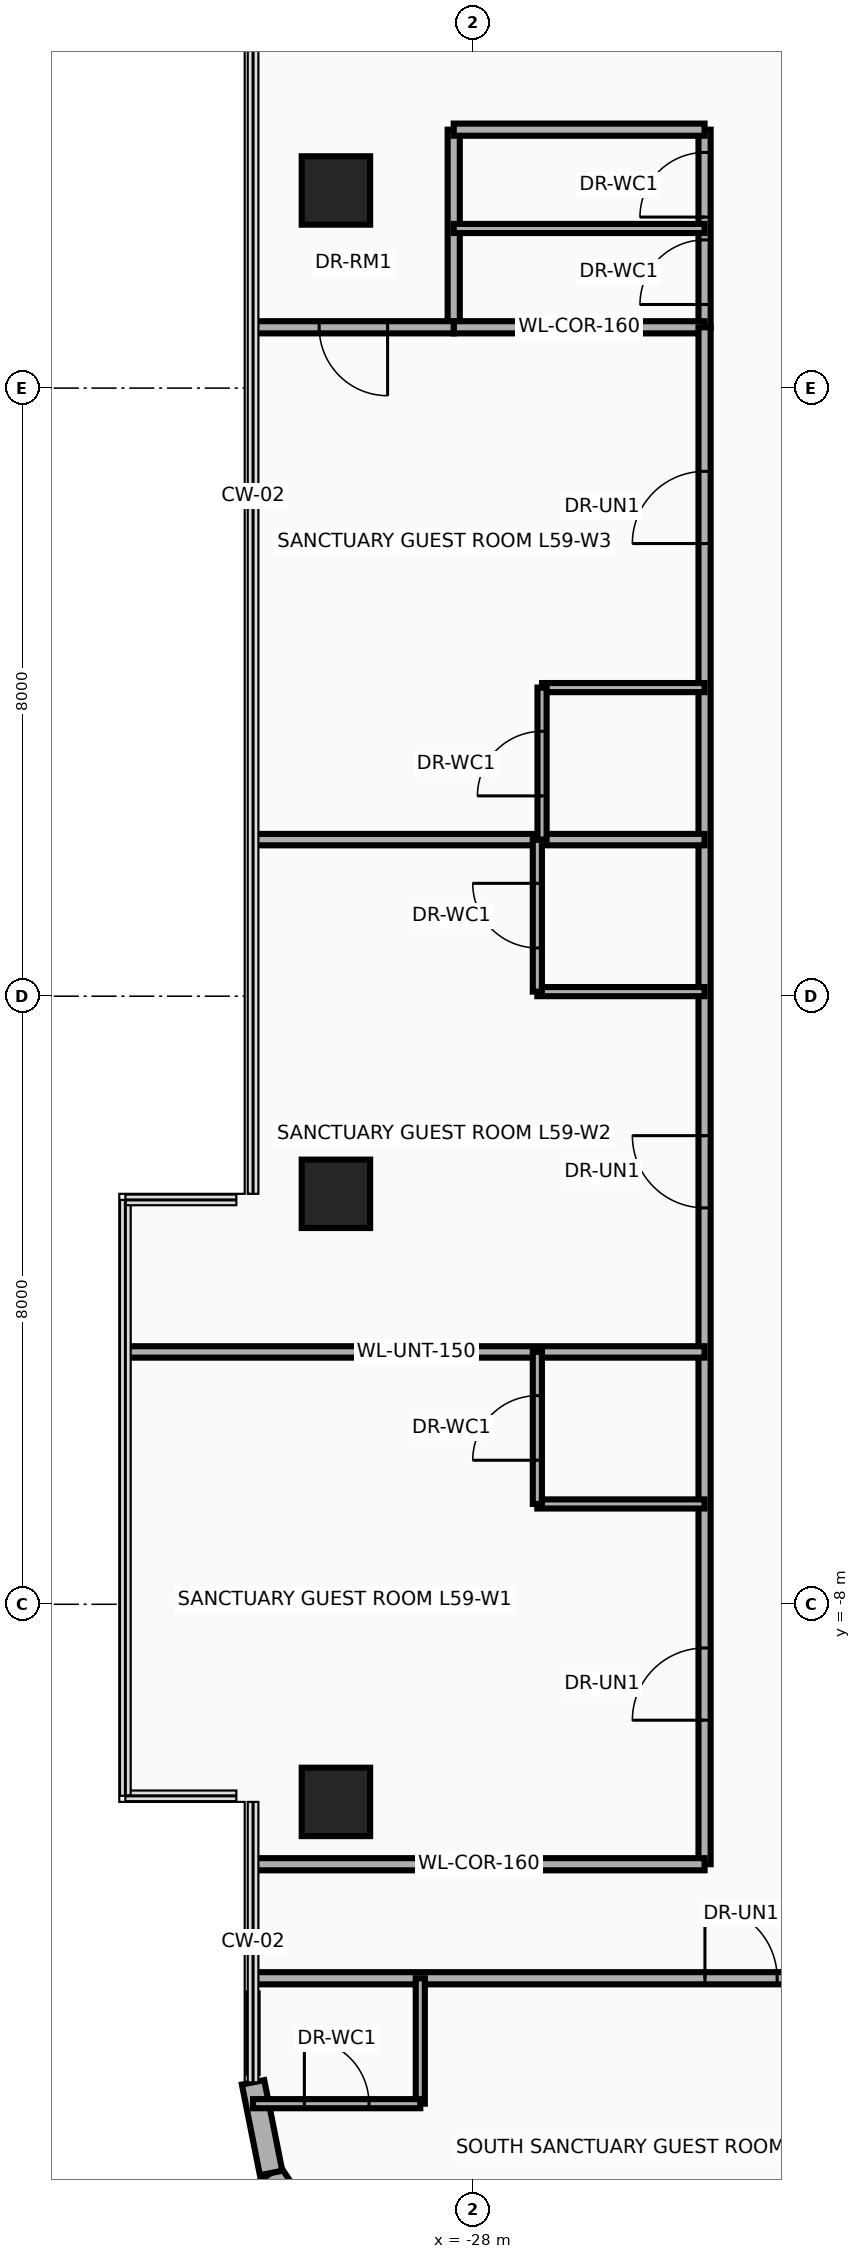
"""IFC4 building model, lengths in metres.
Left out: names, types, materials, properties, quantities, classifications, styles, units other than length and angle.
Written with IfcOpenShell. Run it as: python <this file> out.ifc"""

import sys

from ifc_helpers import new_model, si_unit, direction, frame, frame_2d, origin, origin_2d, place, context, subcontext, project, spatial, rectangle, extrude, source, transform, mapped, element, fill, save


model = new_model("IFC4")
c1 = context("Model", 3, precision=1e-05, world=origin(), true_north=direction((0.0, 1.0)))
c2 = subcontext(c1, "Body", "Model", "MODEL_VIEW")
j1 = project(units=[si_unit("LENGTHUNIT", "METRE"), si_unit("PLANEANGLEUNIT", "RADIAN")], contexts=[c1])
p1 = place(None, origin())
s1 = spatial("IfcSite", under=j1, at=p1, CompositionType="ELEMENT")
p2 = place(p1, origin())
s2 = spatial("IfcBuilding", under=s1, at=p2, CompositionType="ELEMENT")
p3 = place(p2, frame((0.0, 0.0, 230.0)))
s3 = spatial("IfcBuildingStorey", under=s2, at=p3, CompositionType="ELEMENT", Elevation=230.0)
m1 = source(origin(), c2, "Body", "SweptSolid", [
    extrude(rectangle(XDim=0.9, YDim=0.9, at=origin_2d()), origin(), (0.0, 0.0, 1.0), 3.5),
])
for number, where, z_axis, x_axis in (
    (1, (-29.8, -10.6, 0.0), (0.0, 0.0, 1.0), (1.0, 0.0, 0.0)),
    (2, (-29.8, -2.6, 0.0), (0.0, 0.0, 1.0), (1.0, 0.0, 0.0)),
    (3, (-29.8, 10.6, 0.0), (0.0, 0.0, 1.0), (1.0, 0.0, 0.0)),
):
    element("IfcColumn", number, at=place(p3, frame(where, z_axis=z_axis, x_axis=x_axis)), inside=s3, PredefinedType="COLUMN", context=c2, shape_type="MappedRepresentation", body=[
        mapped(m1, transform((0.0, 0.0, 0.0), x_axis=(1.0, 0.0, 0.0), y_axis=(0.0, 1.0, 0.0), z_axis=(0.0, 0.0, 1.0), scale=1.0)),
    ])
p4 = place(p3, frame((-29.983, -16.483, 0.0), z_axis=(0.0, 0.0, 1.0), x_axis=(-0.555635100982, 0.831426265255, 0.0)))
e4 = element("IfcWall", 4, at=p4, inside=s3, PredefinedType="SOLIDWALL", context=c2, shape_type="SweptSolid", body=[
    extrude(rectangle(XDim=1.205, YDim=0.3, at=frame_2d((0.603, 0.0))), origin(), (0.0, 0.0, 1.0), 3.26),
])
p5 = place(p3, frame((-30.653, -15.482, 0.0), z_axis=(0.0, 0.0, 1.0), x_axis=(-0.194996050505, 0.980804027463, 0.0)))
e5 = element("IfcWall", 5, at=p5, inside=s3, PredefinedType="SOLIDWALL", context=c2, shape_type="SweptSolid", body=[
    extrude(rectangle(XDim=1.216, YDim=0.3, at=frame_2d((0.608, 0.0))), origin(), (0.0, 0.0, 1.0), 3.26),
])
p6 = place(p3, frame((-28.25, 8.8, 0.0), z_axis=(0.0, 0.0, 1.0), x_axis=(0.0, 1.0, 0.0)))
e6 = element("IfcWall", 6, at=p6, inside=s3, PredefinedType="PARTITIONING", context=c2, shape_type="SweptSolid", body=[
    extrude(rectangle(XDim=2.6, YDim=0.16, at=frame_2d((1.3, 0.0))), origin(), (0.0, 0.0, 1.0), 2.544),
])
p7 = place(p3, frame((-24.95, 8.8, 0.0), z_axis=(0.0, 0.0, 1.0), x_axis=(0.0, 1.0, 0.0)))
e7 = element("IfcWall", 7, at=p7, inside=s3, PredefinedType="PARTITIONING", context=c2, shape_type="SweptSolid", body=[
    extrude(rectangle(XDim=2.6, YDim=0.16, at=frame_2d((1.3, 0.0))), origin(), (0.0, 0.0, 1.0), 2.544),
])
p8 = place(p7, frame((0.3, 0.0, 0.0)))
e8 = element("IfcOpeningElement", 8, at=p8, cuts=e7, PredefinedType="OPENING", context=c2, shape_type="SweptSolid", body=[
    extrude(rectangle(XDim=0.85, YDim=2.1, at=frame_2d((0.425, 1.05))), frame((0.0, 0.095, 0.0), z_axis=(0.0, -1.0, 0.0), x_axis=(1.0, 0.0, 0.0)), (0.0, 0.0, 1.0), 0.19),
])
p9 = place(p7, frame((1.45, 0.0, 0.0)))
e9 = element("IfcOpeningElement", 9, at=p9, cuts=e7, PredefinedType="OPENING", context=c2, shape_type="SweptSolid", body=[
    extrude(rectangle(XDim=0.85, YDim=2.1, at=frame_2d((0.425, 1.05))), frame((0.0, 0.095, 0.0), z_axis=(0.0, -1.0, 0.0), x_axis=(1.0, 0.0, 0.0)), (0.0, 0.0, 1.0), 0.19),
])
for number, where, z_axis, x_axis in (
    (10, (-28.25, 8.8, 0.0), (0.0, 0.0, 1.0), (1.0, 0.0, 0.0)),
    (11, (-28.25, 11.4, 0.0), (0.0, 0.0, 1.0), (1.0, 0.0, 0.0)),
):
    element("IfcWall", number, at=place(p3, frame(where, z_axis=z_axis, x_axis=x_axis)), inside=s3, PredefinedType="PARTITIONING", context=c2, shape_type="SweptSolid", body=[
        extrude(rectangle(XDim=3.3, YDim=0.16, at=frame_2d((1.65, 0.0))), origin(), (0.0, 0.0, 1.0), 3.26),
    ])
p10 = place(p3, frame((-28.25, 10.1, 0.0), z_axis=(0.0, 0.0, 1.0), x_axis=(1.0, 0.0, 0.0)))
e12 = element("IfcWall", 12, at=p10, inside=s3, PredefinedType="PARTITIONING", context=c2, shape_type="SweptSolid", body=[
    extrude(rectangle(XDim=3.3, YDim=0.12, at=frame_2d((1.65, 0.0))), origin(), (0.0, 0.0, 1.0), 3.26),
])
p11 = place(p3, frame((-24.95, -11.42, 0.0), z_axis=(0.0, 0.0, 1.0), x_axis=(0.0, 1.0, 0.0)))
e13 = element("IfcWall", 13, at=p11, inside=s3, PredefinedType="PARTITIONING", context=c2, shape_type="SweptSolid", body=[
    extrude(rectangle(XDim=20.22, YDim=0.16, at=frame_2d((10.11, 0.0))), origin(), (0.0, 0.0, 1.0), 2.544),
])
p12 = place(p11, frame((1.895, 0.0, 0.0)))
e14 = element("IfcOpeningElement", 14, at=p12, cuts=e13, PredefinedType="OPENING", context=c2, shape_type="SweptSolid", body=[
    extrude(rectangle(XDim=0.95, YDim=2.15, at=frame_2d((0.475, 1.075))), frame((0.0, 0.095, 0.0), z_axis=(0.0, -1.0, 0.0), x_axis=(1.0, 0.0, 0.0)), (0.0, 0.0, 1.0), 0.19),
])
p13 = place(p11, frame((8.635, 0.0, 0.0)))
e15 = element("IfcOpeningElement", 15, at=p13, cuts=e13, PredefinedType="OPENING", context=c2, shape_type="SweptSolid", body=[
    extrude(rectangle(XDim=0.95, YDim=2.15, at=frame_2d((0.475, 1.075))), frame((0.0, 0.095, 0.0), z_axis=(0.0, -1.0, 0.0), x_axis=(1.0, 0.0, 0.0)), (0.0, 0.0, 1.0), 0.19),
])
p14 = place(p11, frame((17.375, 0.0, 0.0)))
e16 = element("IfcOpeningElement", 16, at=p14, cuts=e13, PredefinedType="OPENING", context=c2, shape_type="SweptSolid", body=[
    extrude(rectangle(XDim=0.95, YDim=2.15, at=frame_2d((0.475, 1.075))), frame((0.0, 0.095, 0.0), z_axis=(0.0, -1.0, 0.0), x_axis=(1.0, 0.0, 0.0)), (0.0, 0.0, 1.0), 0.19),
])
p15 = place(p3, frame((-30.89, 8.8, 0.0), z_axis=(0.0, 0.0, 1.0), x_axis=(1.0, 0.0, 0.0)))
e17 = element("IfcWall", 17, at=p15, inside=s3, PredefinedType="PARTITIONING", context=c2, shape_type="SweptSolid", body=[
    extrude(rectangle(XDim=2.64, YDim=0.16, at=frame_2d((1.32, 0.0))), origin(), (0.0, 0.0, 1.0), 2.706),
])
p16 = place(p15, frame((0.87, 0.0, 0.0)))
e18 = element("IfcOpeningElement", 18, at=p16, cuts=e17, PredefinedType="OPENING", context=c2, shape_type="SweptSolid", body=[
    extrude(rectangle(XDim=0.9, YDim=2.1, at=frame_2d((0.45, 1.05))), frame((0.0, 0.095, 0.0), z_axis=(0.0, -1.0, 0.0), x_axis=(1.0, 0.0, 0.0)), (0.0, 0.0, 1.0), 0.19),
])
p17 = place(p3, frame((-32.54, -4.68, 0.0), z_axis=(0.0, 0.0, 1.0), x_axis=(1.0, 0.0, 0.0)))
e19 = element("IfcWall", 19, at=p17, inside=s3, PredefinedType="PARTITIONING", context=c2, shape_type="SweptSolid", body=[
    extrude(rectangle(XDim=7.59, YDim=0.15, at=frame_2d((3.795, 0.0))), origin(), (0.0, 0.0, 1.0), 2.706),
])
p18 = place(p3, frame((-30.89, 2.06, 0.0), z_axis=(0.0, 0.0, 1.0), x_axis=(1.0, 0.0, 0.0)))
e20 = element("IfcWall", 20, at=p18, inside=s3, PredefinedType="PARTITIONING", context=c2, shape_type="SweptSolid", body=[
    extrude(rectangle(XDim=5.94, YDim=0.15, at=frame_2d((2.97, 0.0))), origin(), (0.0, 0.0, 1.0), 2.706),
])
p19 = place(p3, frame((-27.15, -6.68, 0.0), z_axis=(0.0, 0.0, 1.0), x_axis=(1.0, 0.0, 0.0)))
e21 = element("IfcWall", 21, at=p19, inside=s3, PredefinedType="PARTITIONING", context=c2, shape_type="SweptSolid", body=[
    extrude(rectangle(XDim=2.2, YDim=0.12, at=frame_2d((1.1, 0.0))), origin(), (0.0, 0.0, 1.0), 2.839),
])
p20 = place(p3, frame((-27.15, -6.68, 0.0), z_axis=(0.0, 0.0, 1.0), x_axis=(0.0, 1.0, 0.0)))
e22 = element("IfcWall", 22, at=p20, inside=s3, PredefinedType="PARTITIONING", context=c2, shape_type="SweptSolid", body=[
    extrude(rectangle(XDim=2.0, YDim=0.12, at=frame_2d((1.0, 0.0))), origin(), (0.0, 0.0, 1.0), 2.839),
])
p21 = place(p20, frame((0.575, 0.0, 0.0)))
e23 = element("IfcOpeningElement", 23, at=p21, cuts=e22, PredefinedType="OPENING", context=c2, shape_type="SweptSolid", body=[
    extrude(rectangle(XDim=0.85, YDim=2.1, at=frame_2d((0.425, 1.05))), frame((0.0, 0.075, 0.0), z_axis=(0.0, -1.0, 0.0), x_axis=(1.0, 0.0, 0.0)), (0.0, 0.0, 1.0), 0.15),
])
p22 = place(p3, frame((-27.15, 0.06, 0.0), z_axis=(0.0, 0.0, 1.0), x_axis=(1.0, 0.0, 0.0)))
e24 = element("IfcWall", 24, at=p22, inside=s3, PredefinedType="PARTITIONING", context=c2, shape_type="SweptSolid", body=[
    extrude(rectangle(XDim=2.2, YDim=0.12, at=frame_2d((1.1, 0.0))), origin(), (0.0, 0.0, 1.0), 2.839),
])
p23 = place(p3, frame((-27.15, 0.06, 0.0), z_axis=(0.0, 0.0, 1.0), x_axis=(0.0, 1.0, 0.0)))
e25 = element("IfcWall", 25, at=p23, inside=s3, PredefinedType="PARTITIONING", context=c2, shape_type="SweptSolid", body=[
    extrude(rectangle(XDim=2.0, YDim=0.12, at=frame_2d((1.0, 0.0))), origin(), (0.0, 0.0, 1.0), 2.839),
])
p24 = place(p23, frame((0.575, 0.0, 0.0)))
e26 = element("IfcOpeningElement", 26, at=p24, cuts=e25, PredefinedType="OPENING", context=c2, shape_type="SweptSolid", body=[
    extrude(rectangle(XDim=0.85, YDim=2.1, at=frame_2d((0.425, 1.05))), frame((0.0, 0.075, 0.0), z_axis=(0.0, -1.0, 0.0), x_axis=(1.0, 0.0, 0.0)), (0.0, 0.0, 1.0), 0.15),
])
p25 = place(p3, frame((-27.088, 4.06, 0.0), z_axis=(0.0, 0.0, 1.0), x_axis=(1.0, 0.0, 0.0)))
e27 = element("IfcWall", 27, at=p25, inside=s3, PredefinedType="PARTITIONING", context=c2, shape_type="SweptSolid", body=[
    extrude(rectangle(XDim=2.138, YDim=0.12, at=frame_2d((1.069, 0.0))), origin(), (0.0, 0.0, 1.0), 3.26),
])
p26 = place(p3, frame((-27.088, 2.06, 0.0), z_axis=(0.0, 0.0, 1.0), x_axis=(0.0, 1.0, 0.0)))
e28 = element("IfcWall", 28, at=p26, inside=s3, PredefinedType="PARTITIONING", context=c2, shape_type="SweptSolid", body=[
    extrude(rectangle(XDim=2.0, YDim=0.12, at=frame_2d((1.0, 0.0))), origin(), (0.0, 0.0, 1.0), 2.839),
])
p27 = place(p26, frame((0.575, 0.0, 0.0)))
e29 = element("IfcOpeningElement", 29, at=p27, cuts=e28, PredefinedType="OPENING", context=c2, shape_type="SweptSolid", body=[
    extrude(rectangle(XDim=0.85, YDim=2.1, at=frame_2d((0.425, 1.05))), frame((0.0, 0.075, 0.0), z_axis=(0.0, -1.0, 0.0), x_axis=(1.0, 0.0, 0.0)), (0.0, 0.0, 1.0), 0.15),
])
p28 = place(p3, frame((-30.89, -12.92, 0.0), z_axis=(0.0, 0.0, 1.0), x_axis=(1.0, 0.0, 0.0)))
e30 = element("IfcWall", 30, at=p28, inside=s3, PredefinedType="PARTITIONING", context=c2, shape_type="SweptSolid", body=[
    extrude(rectangle(XDim=21.28, YDim=0.16, at=frame_2d((10.64, 0.0))), origin(), (0.0, 0.0, 1.0), 2.634),
])
p29 = place(p28, frame((5.945, 0.0, 0.0)))
e31 = element("IfcOpeningElement", 31, at=p29, cuts=e30, PredefinedType="OPENING", context=c2, shape_type="SweptSolid", body=[
    extrude(rectangle(XDim=0.95, YDim=2.15, at=frame_2d((0.475, 1.075))), frame((0.0, 0.095, 0.0), z_axis=(0.0, -1.0, 0.0), x_axis=(1.0, 0.0, 0.0)), (0.0, 0.0, 1.0), 0.19),
])
p30 = place(p28, frame((16.585, 0.0, 0.0)))
e32 = element("IfcOpeningElement", 32, at=p30, cuts=e30, PredefinedType="OPENING", context=c2, shape_type="SweptSolid", body=[
    extrude(rectangle(XDim=0.95, YDim=2.15, at=frame_2d((0.475, 1.075))), frame((0.0, 0.095, 0.0), z_axis=(0.0, -1.0, 0.0), x_axis=(1.0, 0.0, 0.0)), (0.0, 0.0, 1.0), 0.19),
])
p31 = place(p3, frame((-28.69, -14.57, 0.0), z_axis=(0.0, 0.0, 1.0), x_axis=(0.0, 1.0, 0.0)))
e33 = element("IfcWall", 33, at=p31, inside=s3, PredefinedType="PARTITIONING", context=c2, shape_type="SweptSolid", body=[
    extrude(rectangle(XDim=1.65, YDim=0.12, at=frame_2d((0.825, 0.0))), origin(), (0.0, 0.0, 1.0), 3.26),
])
p32 = place(p3, frame((-30.89, -14.57, 0.0), z_axis=(0.0, 0.0, 1.0), x_axis=(1.0, 0.0, 0.0)))
e34 = element("IfcWall", 34, at=p32, inside=s3, PredefinedType="PARTITIONING", context=c2, shape_type="SweptSolid", body=[
    extrude(rectangle(XDim=2.2, YDim=0.12, at=frame_2d((1.1, 0.0))), origin(), (0.0, 0.0, 1.0), 3.26),
])
p33 = place(p32, frame((0.675, 0.0, 0.0)))
e35 = element("IfcOpeningElement", 35, at=p33, cuts=e34, PredefinedType="OPENING", context=c2, shape_type="SweptSolid", body=[
    extrude(rectangle(XDim=0.85, YDim=2.1, at=frame_2d((0.425, 1.05))), frame((0.0, 0.075, 0.0), z_axis=(0.0, -1.0, 0.0), x_axis=(1.0, 0.0, 0.0)), (0.0, 0.0, 1.0), 0.15),
])
p34 = place(p3, frame((-30.89, -14.167, 0.0), z_axis=(0.0, 0.0, 1.0), x_axis=(0.0, 1.0, 0.0)))
e36 = element("IfcWall", 36, at=p34, inside=s3, PredefinedType="PARTITIONING", context=c2, shape_type="SweptSolid", body=[
    extrude(rectangle(XDim=1.047, YDim=0.12, at=frame_2d((0.523, 0.0))), origin(), (0.0, 0.0, 1.0), 3.26),
])
p35 = place(p3, frame((-30.89, -11.42, 0.0), z_axis=(0.0, 0.0, 1.0), x_axis=(1.0, 0.0, 0.0)))
e37 = element("IfcWall", 37, at=p35, inside=s3, PredefinedType="PARTITIONING", context=c2, shape_type="SweptSolid", body=[
    extrude(rectangle(XDim=5.94, YDim=0.16, at=frame_2d((2.97, 0.0))), origin(), (0.0, 0.0, 1.0), 3.26),
])
p36 = place(p8, origin())
e38 = element("IfcDoor", 38, at=p36, inside=s3, OperationType="SINGLE_SWING_LEFT", PredefinedType="DOOR", context=c2, shape_type="SweptSolid", body=[
    extrude(rectangle(XDim=0.85, YDim=2.1, at=frame_2d((0.425, 1.05))), frame((0.0, 0.025, 0.0), z_axis=(0.0, -1.0, 0.0), x_axis=(1.0, 0.0, 0.0)), (0.0, 0.0, 1.0), 0.05),
])
fill(e8, e38)
p37 = place(p9, origin())
e39 = element("IfcDoor", 39, at=p37, inside=s3, OperationType="SINGLE_SWING_RIGHT", PredefinedType="DOOR", context=c2, shape_type="SweptSolid", body=[
    extrude(rectangle(XDim=0.85, YDim=2.1, at=frame_2d((0.425, 1.05))), frame((0.0, 0.025, 0.0), z_axis=(0.0, -1.0, 0.0), x_axis=(1.0, 0.0, 0.0)), (0.0, 0.0, 1.0), 0.05),
])
fill(e9, e39)
p38 = place(p16, frame((0.9, 0.0, 0.0), z_axis=(0.0, 0.0, 1.0), x_axis=(-1.0, 0.0, 0.0)))
e40 = element("IfcDoor", 40, at=p38, inside=s3, OperationType="SINGLE_SWING_LEFT", PredefinedType="DOOR", context=c2, shape_type="SweptSolid", body=[
    extrude(rectangle(XDim=0.9, YDim=2.1, at=frame_2d((0.45, 1.05))), frame((0.0, 0.025, 0.0), z_axis=(0.0, -1.0, 0.0), x_axis=(1.0, 0.0, 0.0)), (0.0, 0.0, 1.0), 0.05),
])
fill(e18, e40)
p39 = place(p12, origin())
e41 = element("IfcDoor", 41, at=p39, inside=s3, OperationType="SINGLE_SWING_RIGHT", PredefinedType="DOOR", context=c2, shape_type="SweptSolid", body=[
    extrude(rectangle(XDim=0.95, YDim=2.15, at=frame_2d((0.475, 1.075))), frame((0.0, 0.025, 0.0), z_axis=(0.0, -1.0, 0.0), x_axis=(1.0, 0.0, 0.0)), (0.0, 0.0, 1.0), 0.05),
])
fill(e14, e41)
p40 = place(p21, origin())
e42 = element("IfcDoor", 42, at=p40, inside=s3, OperationType="SINGLE_SWING_LEFT", PredefinedType="DOOR", context=c2, shape_type="SweptSolid", body=[
    extrude(rectangle(XDim=0.85, YDim=2.1, at=frame_2d((0.425, 1.05))), frame((0.0, 0.025, 0.0), z_axis=(0.0, -1.0, 0.0), x_axis=(1.0, 0.0, 0.0)), (0.0, 0.0, 1.0), 0.05),
])
fill(e23, e42)
p41 = place(p13, origin())
e43 = element("IfcDoor", 43, at=p41, inside=s3, OperationType="SINGLE_SWING_RIGHT", PredefinedType="DOOR", context=c2, shape_type="SweptSolid", body=[
    extrude(rectangle(XDim=0.95, YDim=2.15, at=frame_2d((0.475, 1.075))), frame((0.0, 0.025, 0.0), z_axis=(0.0, -1.0, 0.0), x_axis=(1.0, 0.0, 0.0)), (0.0, 0.0, 1.0), 0.05),
])
fill(e15, e43)
p42 = place(p24, origin())
e44 = element("IfcDoor", 44, at=p42, inside=s3, OperationType="SINGLE_SWING_LEFT", PredefinedType="DOOR", context=c2, shape_type="SweptSolid", body=[
    extrude(rectangle(XDim=0.85, YDim=2.1, at=frame_2d((0.425, 1.05))), frame((0.0, 0.025, 0.0), z_axis=(0.0, -1.0, 0.0), x_axis=(1.0, 0.0, 0.0)), (0.0, 0.0, 1.0), 0.05),
])
fill(e26, e44)
p43 = place(p14, origin())
e45 = element("IfcDoor", 45, at=p43, inside=s3, OperationType="SINGLE_SWING_RIGHT", PredefinedType="DOOR", context=c2, shape_type="SweptSolid", body=[
    extrude(rectangle(XDim=0.95, YDim=2.15, at=frame_2d((0.475, 1.075))), frame((0.0, 0.025, 0.0), z_axis=(0.0, -1.0, 0.0), x_axis=(1.0, 0.0, 0.0)), (0.0, 0.0, 1.0), 0.05),
])
fill(e16, e45)
p44 = place(p27, origin())
e46 = element("IfcDoor", 46, at=p44, inside=s3, OperationType="SINGLE_SWING_LEFT", PredefinedType="DOOR", context=c2, shape_type="SweptSolid", body=[
    extrude(rectangle(XDim=0.85, YDim=2.1, at=frame_2d((0.425, 1.05))), frame((0.0, 0.025, 0.0), z_axis=(0.0, -1.0, 0.0), x_axis=(1.0, 0.0, 0.0)), (0.0, 0.0, 1.0), 0.05),
])
fill(e29, e46)
p45 = place(p29, origin())
e47 = element("IfcDoor", 47, at=p45, inside=s3, OperationType="SINGLE_SWING_RIGHT", PredefinedType="DOOR", context=c2, shape_type="SweptSolid", body=[
    extrude(rectangle(XDim=0.95, YDim=2.15, at=frame_2d((0.475, 1.075))), frame((0.0, 0.025, 0.0), z_axis=(0.0, -1.0, 0.0), x_axis=(1.0, 0.0, 0.0)), (0.0, 0.0, 1.0), 0.05),
])
fill(e31, e47)
p46 = place(p33, origin())
e48 = element("IfcDoor", 48, at=p46, inside=s3, OperationType="SINGLE_SWING_LEFT", PredefinedType="DOOR", context=c2, shape_type="SweptSolid", body=[
    extrude(rectangle(XDim=0.85, YDim=2.1, at=frame_2d((0.425, 1.05))), frame((0.0, 0.025, 0.0), z_axis=(0.0, -1.0, 0.0), x_axis=(1.0, 0.0, 0.0)), (0.0, 0.0, 1.0), 0.05),
])
fill(e35, e48)
save(model, sys.argv[1])
